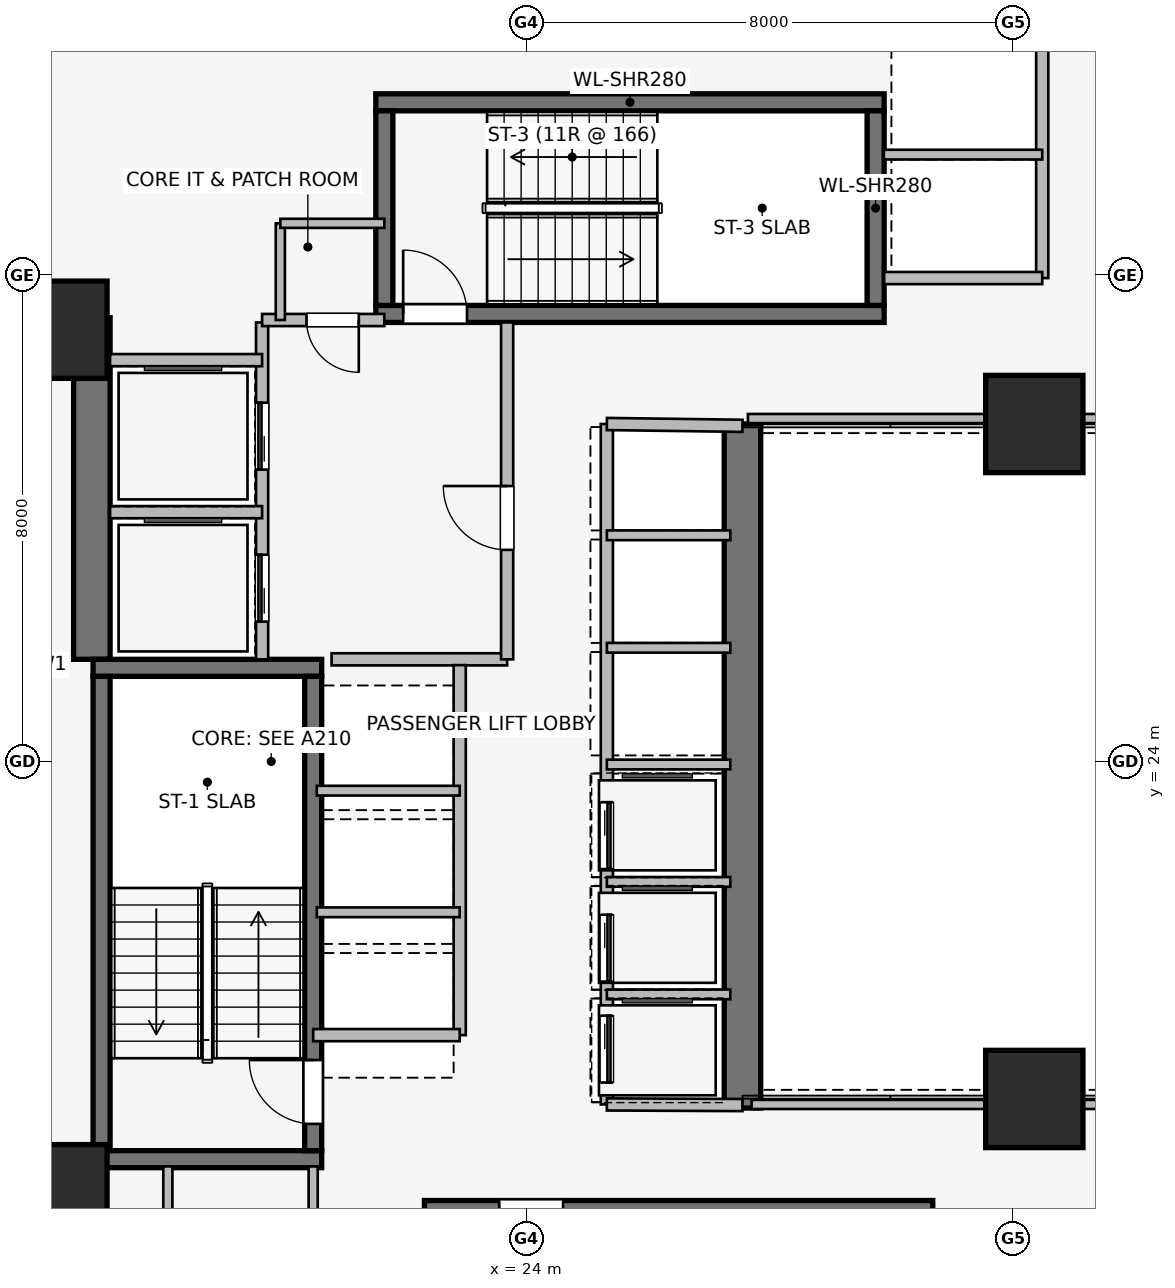
"""IFC4 building model, lengths in metres.
Left out: names, types, materials, properties, quantities, classifications, styles, units other than length and angle.
Written with IfcOpenShell. Run it as: python <this file> out.ifc"""

import sys

from ifc_helpers import new_model, si_unit, direction, frame, frame_2d, origin, origin_2d, place, context, subcontext, project, spatial, rectangle, extrude, element, fill, save


model = new_model("IFC4")
c1 = context("Model", 3, precision=1e-05, world=origin(), true_north=direction((0.0, 1.0)))
c2 = subcontext(c1, "Body", "Model", "MODEL_VIEW")
j1 = project(units=[si_unit("LENGTHUNIT", "METRE"), si_unit("PLANEANGLEUNIT", "RADIAN")], contexts=[c1])
p1 = place(None, origin())
s1 = spatial("IfcSite", under=j1, at=p1, CompositionType="ELEMENT")
p2 = place(p1, origin())
s2 = spatial("IfcBuilding", under=s1, at=p2, CompositionType="ELEMENT")
p3 = place(p2, frame((0.0, 0.0, 34.3)))
s3 = spatial("IfcBuildingStorey", under=s2, at=p3, CompositionType="ELEMENT", Elevation=34.3)
p4 = place(p3, frame((16.85, 25.68, 0.0), z_axis=(0.0, 0.0, 1.0), x_axis=(0.0, 1.0, 0.0)))
e1 = element("IfcWall", 1, at=p4, inside=s3, PredefinedType="SHEAR", context=c2, shape_type="SweptSolid", body=[
    extrude(rectangle(XDim=5.62, YDim=0.6, at=frame_2d((2.81, 0.0))), origin(), (0.0, 0.0, 1.0), 3.65),
])
p5 = place(p3, frame((27.55, 29.55, 0.0), z_axis=(0.0, 0.0, 1.0), x_axis=(0.0, -1.0, 0.0)))
e2 = element("IfcWall", 2, at=p5, inside=s3, PredefinedType="SHEAR", context=c2, shape_type="SweptSolid", body=[
    extrude(rectangle(XDim=11.25, YDim=0.6, at=frame_2d((5.625, 0.0))), origin(), (0.0, 0.0, 1.0), 3.65),
])
for number, where, z_axis, x_axis in (
    (3, (16.87, 17.46, 0.0), (0.0, 0.0, 1.0), (1.0, 0.0, 0.0)),
    (4, (20.63, 25.54, 0.0), (0.0, 0.0, 1.0), (-1.0, 0.0, 0.0)),
):
    element("IfcWall", number, at=place(p3, frame(where, z_axis=z_axis, x_axis=x_axis)), inside=s3, PredefinedType="SHEAR", context=c2, shape_type="SweptSolid", body=[
        extrude(rectangle(XDim=3.76, YDim=0.28, at=frame_2d((1.88, 0.0))), origin(), (0.0, 0.0, 1.0), 3.65),
    ])
p6 = place(p3, frame((17.01, 25.4, 0.0), z_axis=(0.0, 0.0, 1.0), x_axis=(0.0, -1.0, 0.0)))
e5 = element("IfcWall", 5, at=p6, inside=s3, PredefinedType="SHEAR", context=c2, shape_type="SweptSolid", body=[
    extrude(rectangle(XDim=7.8, YDim=0.28, at=frame_2d((3.9, 0.0))), origin(), (0.0, 0.0, 1.0), 3.65),
])
p7 = place(p3, frame((20.49, 17.6, 0.0), z_axis=(0.0, 0.0, 1.0), x_axis=(0.0, 1.0, 0.0)))
e6 = element("IfcWall", 6, at=p7, inside=s3, PredefinedType="SHEAR", context=c2, shape_type="SweptSolid", body=[
    extrude(rectangle(XDim=7.8, YDim=0.28, at=frame_2d((3.9, 0.0))), origin(), (0.0, 0.0, 1.0), 3.65),
])
p8 = place(p7, frame((0.44, 0.0, 0.0)))
e7 = element("IfcOpeningElement", 7, at=p8, cuts=e6, PredefinedType="OPENING", context=c2, shape_type="SweptSolid", body=[
    extrude(rectangle(XDim=1.05, YDim=2.0, at=frame_2d((0.525, 1.0))), frame((0.0, 0.15, 0.0), z_axis=(0.0, -1.0, 0.0), x_axis=(1.0, 0.0, 0.0)), (0.0, 0.0, 1.0), 0.3),
])
p9 = place(p3, frame((30.68, 16.64, 0.0), z_axis=(0.0, 0.0, 1.0), x_axis=(-1.0, 0.0, 0.0)))
e8 = element("IfcWall", 8, at=p9, inside=s3, PredefinedType="SHEAR", context=c2, shape_type="SweptSolid", body=[
    extrude(rectangle(XDim=8.36, YDim=0.28, at=frame_2d((4.18, 0.0))), origin(), (0.0, 0.0, 1.0), 3.65),
])
p10 = place(p9, frame((6.08, 0.0, 0.0)))
e9 = element("IfcOpeningElement", 9, at=p10, cuts=e8, PredefinedType="OPENING", context=c2, shape_type="SweptSolid", body=[
    extrude(rectangle(XDim=1.05, YDim=2.0, at=frame_2d((0.525, 1.0))), frame((0.0, 0.15, 0.0), z_axis=(0.0, -1.0, 0.0), x_axis=(1.0, 0.0, 0.0)), (0.0, 0.0, 1.0), 0.3),
])
p11 = place(p3, frame((21.52, 31.36, 0.0), z_axis=(0.0, 0.0, 1.0), x_axis=(1.0, 0.0, 0.0)))
e10 = element("IfcWall", 10, at=p11, inside=s3, PredefinedType="SHEAR", context=c2, shape_type="SweptSolid", body=[
    extrude(rectangle(XDim=8.36, YDim=0.28, at=frame_2d((4.18, 0.0))), origin(), (0.0, 0.0, 1.0), 3.65),
])
p12 = place(p11, frame((0.45, 0.0, 0.0)))
e11 = element("IfcOpeningElement", 11, at=p12, cuts=e10, PredefinedType="OPENING", context=c2, shape_type="SweptSolid", body=[
    extrude(rectangle(XDim=1.05, YDim=2.0, at=frame_2d((0.525, 1.0))), frame((0.0, 0.15, 0.0), z_axis=(0.0, -1.0, 0.0), x_axis=(1.0, 0.0, 0.0)), (0.0, 0.0, 1.0), 0.3),
])
p13 = place(p3, frame((29.88, 34.84, 0.0), z_axis=(0.0, 0.0, 1.0), x_axis=(-1.0, 0.0, 0.0)))
e12 = element("IfcWall", 12, at=p13, inside=s3, PredefinedType="SHEAR", context=c2, shape_type="SweptSolid", body=[
    extrude(rectangle(XDim=8.36, YDim=0.28, at=frame_2d((4.18, 0.0))), origin(), (0.0, 0.0, 1.0), 3.65),
])
for number, where, z_axis, x_axis in (
    (13, (21.66, 34.7, 0.0), (0.0, 0.0, 1.0), (0.0, -1.0, 0.0)),
    (14, (29.74, 31.5, 0.0), (0.0, 0.0, 1.0), (0.0, 1.0, 0.0)),
):
    element("IfcWall", number, at=place(p3, frame(where, z_axis=z_axis, x_axis=x_axis)), inside=s3, PredefinedType="SHEAR", context=c2, shape_type="SweptSolid", body=[
        extrude(rectangle(XDim=3.2, YDim=0.28, at=frame_2d((1.6, 0.0))), origin(), (0.0, 0.0, 1.0), 3.65),
    ])
for number, where, z_axis, x_axis in (
    (15, (16.3, 16.9, 0.0), (0.0, 0.0, 1.0), (1.0, 0.0, 0.0)),
    (16, (16.3, 31.1, 0.0), (0.0, 0.0, 1.0), (1.0, 0.0, 0.0)),
    (17, (32.35, 18.45, 0.0), (0.0, 0.0, 1.0), (1.0, 0.0, 0.0)),
    (18, (32.35, 29.55, 0.0), (0.0, 0.0, 1.0), (1.0, 0.0, 0.0)),
):
    element("IfcColumn", number, at=place(p3, frame(where, z_axis=z_axis, x_axis=x_axis)), inside=s3, PredefinedType="COLUMN", context=c2, shape_type="SweptSolid", body=[
        extrude(rectangle(XDim=1.6, YDim=1.6, at=origin_2d()), origin(), (0.0, 0.0, 1.0), 3.65),
    ])
p14 = place(p3, frame((19.65, 25.68, 0.0), z_axis=(0.0, 0.0, 1.0), x_axis=(0.0, 1.0, 0.0)))
e19 = element("IfcWall", 19, at=p14, inside=s3, PredefinedType="PARTITIONING", context=c2, shape_type="SweptSolid", body=[
    extrude(rectangle(XDim=5.54, YDim=0.2, at=frame_2d((2.77, 0.0))), origin(), (0.0, 0.0, 1.0), 3.39),
])
p15 = place(p14, frame((0.62, 0.0, 0.0)))
e20 = element("IfcOpeningElement", 20, at=p15, cuts=e19, PredefinedType="OPENING", context=c2, shape_type="SweptSolid", body=[
    extrude(rectangle(XDim=1.1, YDim=2.2, at=frame_2d((0.55, 1.1))), frame((0.0, 0.11, 0.0), z_axis=(0.0, -1.0, 0.0), x_axis=(1.0, 0.0, 0.0)), (0.0, 0.0, 1.0), 0.22),
])
p16 = place(p14, frame((3.12, 0.0, 0.0)))
e21 = element("IfcOpeningElement", 21, at=p16, cuts=e19, PredefinedType="OPENING", context=c2, shape_type="SweptSolid", body=[
    extrude(rectangle(XDim=1.1, YDim=2.2, at=frame_2d((0.55, 1.1))), frame((0.0, 0.11, 0.0), z_axis=(0.0, -1.0, 0.0), x_axis=(1.0, 0.0, 0.0)), (0.0, 0.0, 1.0), 0.22),
])
p17 = place(p3, frame((20.793, 25.68, 0.0), z_axis=(0.0, 0.0, 1.0), x_axis=(1.0, 0.0, 0.0)))
e22 = element("IfcWall", 22, at=p17, inside=s3, PredefinedType="PARTITIONING", context=c2, shape_type="SweptSolid", body=[
    extrude(rectangle(XDim=2.887, YDim=0.2, at=frame_2d((1.443, 0.0))), origin(), (0.0, 0.0, 1.0), 3.39),
])
p18 = place(p3, frame((23.68, 25.68, 0.0), z_axis=(0.0, 0.0, 1.0), x_axis=(0.0, 1.0, 0.0)))
e23 = element("IfcWall", 23, at=p18, inside=s3, PredefinedType="PARTITIONING", context=c2, shape_type="SweptSolid", body=[
    extrude(rectangle(XDim=5.54, YDim=0.2, at=frame_2d((2.77, 0.0))), origin(), (0.0, 0.0, 1.0), 3.39),
])
p19 = place(p18, frame((1.8, 0.0, 0.0)))
e24 = element("IfcOpeningElement", 24, at=p19, cuts=e23, PredefinedType="OPENING", context=c2, shape_type="SweptSolid", body=[
    extrude(rectangle(XDim=1.05, YDim=2.0, at=frame_2d((0.525, 1.0))), frame((0.0, 0.11, 0.0), z_axis=(0.0, -1.0, 0.0), x_axis=(1.0, 0.0, 0.0)), (0.0, 0.0, 1.0), 0.22),
])
p20 = place(p3, frame((21.66, 31.26, 0.0), z_axis=(0.0, 0.0, 1.0), x_axis=(-1.0, 0.0, 0.0)))
e25 = element("IfcWall", 25, at=p20, inside=s3, PredefinedType="PARTITIONING", context=c2, shape_type="SweptSolid", body=[
    extrude(rectangle(XDim=2.01, YDim=0.2, at=frame_2d((1.005, 0.0))), origin(), (0.0, 0.0, 1.0), 3.39),
])
p21 = place(p20, frame((0.42, 0.0, 0.0)))
e26 = element("IfcOpeningElement", 26, at=p21, cuts=e25, PredefinedType="OPENING", context=c2, shape_type="SweptSolid", body=[
    extrude(rectangle(XDim=0.86, YDim=2.0, at=frame_2d((0.43, 1.0))), frame((0.0, 0.11, 0.0), z_axis=(0.0, -1.0, 0.0), x_axis=(1.0, 0.0, 0.0)), (0.0, 0.0, 1.0), 0.22),
])
p22 = place(p3, frame((17.15, 28.1, 0.0), z_axis=(0.0, 0.0, 1.0), x_axis=(1.0, 0.0, 0.0)))
e27 = element("IfcWall", 27, at=p22, inside=s3, PredefinedType="PARTITIONING", context=c2, shape_type="SweptSolid", body=[
    extrude(rectangle(XDim=2.5, YDim=0.2, at=frame_2d((1.25, 0.0))), origin(), (0.0, 0.0, 1.0), 3.39),
])
p23 = place(p3, frame((19.65, 30.6, 0.0), z_axis=(0.0, 0.0, 1.0), x_axis=(-1.0, 0.0, 0.0)))
e28 = element("IfcWall", 28, at=p23, inside=s3, PredefinedType="PARTITIONING", context=c2, shape_type="SweptSolid", body=[
    extrude(rectangle(XDim=2.5, YDim=0.2, at=frame_2d((1.25, 0.0))), origin(), (0.0, 0.0, 1.0), 2.29),
])
p24 = place(p3, frame((32.48, 31.95, 0.0), z_axis=(0.0, 0.0, 1.0), x_axis=(0.0, 1.0, 0.0)))
e29 = element("IfcWall", 29, at=p24, inside=s3, PredefinedType="PARTITIONING", context=c2, shape_type="SweptSolid", body=[
    extrude(rectangle(XDim=4.05, YDim=0.2, at=frame_2d((2.025, 0.0))), origin(), (0.0, 0.0, 1.0), 2.513),
])
p25 = place(p3, frame((32.48, 31.95, 0.0), z_axis=(0.0, 0.0, 1.0), x_axis=(-1.0, 0.0, 0.0)))
e30 = element("IfcWall", 30, at=p25, inside=s3, PredefinedType="PARTITIONING", context=c2, shape_type="SweptSolid", body=[
    extrude(rectangle(XDim=2.6, YDim=0.2, at=frame_2d((1.3, 0.0))), origin(), (0.0, 0.0, 1.0), 3.39),
])
p26 = place(p3, frame((29.875, 33.98, 0.0), z_axis=(0.0, 0.0, 1.0), x_axis=(1.0, 0.0, 0.0)))
e31 = element("IfcWall", 31, at=p26, inside=s3, PredefinedType="PARTITIONING", context=c2, shape_type="SweptSolid", body=[
    extrude(rectangle(XDim=2.605, YDim=0.16, at=frame_2d((1.302, 0.0))), origin(), (0.0, 0.0, 1.0), 3.39),
])
p27 = place(p3, frame((22.9, 19.5, 0.0), z_axis=(0.0, 0.0, 1.0), x_axis=(0.0, 1.0, 0.0)))
e32 = element("IfcWall", 32, at=p27, inside=s3, PredefinedType="PARTITIONING", context=c2, shape_type="SweptSolid", body=[
    extrude(rectangle(XDim=6.085, YDim=0.2, at=frame_2d((3.042, 0.0))), origin(), (0.0, 0.0, 1.0), 3.39),
])
p28 = place(p3, frame((20.49, 19.5, 0.0), z_axis=(0.0, 0.0, 1.0), x_axis=(1.0, 0.0, 0.0)))
e33 = element("IfcWall", 33, at=p28, inside=s3, PredefinedType="PARTITIONING", context=c2, shape_type="SweptSolid", body=[
    extrude(rectangle(XDim=2.41, YDim=0.2, at=frame_2d((1.205, 0.0))), origin(), (0.0, 0.0, 1.0), 2.29),
])
for number, where, z_axis, x_axis in (
    (34, (20.55, 21.52, 0.0), (0.0, 0.0, 1.0), (1.0, 0.0, 0.0)),
    (35, (20.55, 23.52, 0.0), (0.0, 0.0, 1.0), (1.0, 0.0, 0.0)),
):
    element("IfcWall", number, at=place(p3, frame(where, z_axis=z_axis, x_axis=x_axis)), inside=s3, PredefinedType="PARTITIONING", context=c2, shape_type="SweptSolid", body=[
        extrude(rectangle(XDim=2.35, YDim=0.16, at=frame_2d((1.175, 0.0))), origin(), (0.0, 0.0, 1.0), 3.39),
    ])
p29 = place(p3, frame((25.32, 29.55, 0.0), z_axis=(0.0, 0.0, 1.0), x_axis=(0.0, -1.0, 0.0)))
e36 = element("IfcWall", 36, at=p29, inside=s3, PredefinedType="PARTITIONING", context=c2, shape_type="SweptSolid", body=[
    extrude(rectangle(XDim=11.19, YDim=0.2, at=frame_2d((5.595, 0.0))), origin(), (0.0, 0.0, 1.0), 3.39),
])
p30 = place(p29, frame((6.22, 0.0, 0.0)))
e37 = element("IfcOpeningElement", 37, at=p30, cuts=e36, PredefinedType="OPENING", context=c2, shape_type="SweptSolid", body=[
    extrude(rectangle(XDim=1.1, YDim=2.2, at=frame_2d((0.55, 1.1))), frame((0.0, 0.11, 0.0), z_axis=(0.0, -1.0, 0.0), x_axis=(1.0, 0.0, 0.0)), (0.0, 0.0, 1.0), 0.22),
])
p31 = place(p29, frame((8.07, 0.0, 0.0)))
e38 = element("IfcOpeningElement", 38, at=p31, cuts=e36, PredefinedType="OPENING", context=c2, shape_type="SweptSolid", body=[
    extrude(rectangle(XDim=1.1, YDim=2.2, at=frame_2d((0.55, 1.1))), frame((0.0, 0.11, 0.0), z_axis=(0.0, -1.0, 0.0), x_axis=(1.0, 0.0, 0.0)), (0.0, 0.0, 1.0), 0.22),
])
p32 = place(p29, frame((9.73, 0.0, 0.0)))
e39 = element("IfcOpeningElement", 39, at=p32, cuts=e36, PredefinedType="OPENING", context=c2, shape_type="SweptSolid", body=[
    extrude(rectangle(XDim=1.1, YDim=2.2, at=frame_2d((0.55, 1.1))), frame((0.0, 0.11, 0.0), z_axis=(0.0, -1.0, 0.0), x_axis=(1.0, 0.0, 0.0)), (0.0, 0.0, 1.0), 0.22),
])
p33 = place(p3, frame((25.32, 18.36, 0.0), z_axis=(0.0, 0.0, 1.0), x_axis=(0.999989925833, -0.004488678231, 0.0)))
e40 = element("IfcWall", 40, at=p33, inside=s3, PredefinedType="PARTITIONING", context=c2, shape_type="SweptSolid", body=[
    extrude(rectangle(XDim=2.23, YDim=0.2, at=frame_2d((1.115, 0.0))), origin(), (0.0, 0.0, 1.0), 3.39),
])
p34 = place(p3, frame((27.55, 29.52, 0.0), z_axis=(0.0, 0.0, 1.0), x_axis=(-0.999909343457, 0.013464949556, 0.0)))
e41 = element("IfcWall", 41, at=p34, inside=s3, PredefinedType="PARTITIONING", context=c2, shape_type="SweptSolid", body=[
    extrude(rectangle(XDim=2.23, YDim=0.2, at=frame_2d((1.115, 0.0))), origin(), (0.0, 0.0, 1.0), 2.29),
])
for number, where, z_axis, x_axis in (
    (42, (25.32, 20.17, 0.0), (0.0, 0.0, 1.0), (1.0, 0.0, 0.0)),
    (43, (25.32, 22.02, 0.0), (0.0, 0.0, 1.0), (1.0, 0.0, 0.0)),
    (44, (25.32, 23.95, 0.0), (0.0, 0.0, 1.0), (1.0, 0.0, 0.0)),
    (45, (25.32, 25.87, 0.0), (0.0, 0.0, 1.0), (1.0, 0.0, 0.0)),
    (46, (25.32, 27.72, 0.0), (0.0, 0.0, 1.0), (1.0, 0.0, 0.0)),
):
    element("IfcWall", number, at=place(p3, frame(where, z_axis=z_axis, x_axis=x_axis)), inside=s3, PredefinedType="PARTITIONING", context=c2, shape_type="SweptSolid", body=[
        extrude(rectangle(XDim=2.03, YDim=0.16, at=frame_2d((1.015, 0.0))), origin(), (0.0, 0.0, 1.0), 3.39),
    ])
p35 = place(p3, frame((18.1, 17.34, 0.0), z_axis=(0.0, 0.0, 1.0), x_axis=(0.0, -1.0, 0.0)))
e47 = element("IfcWall", 47, at=p35, inside=s3, PredefinedType="PARTITIONING", context=c2, shape_type="SweptSolid", body=[
    extrude(rectangle(XDim=4.14, YDim=0.15, at=frame_2d((2.07, 0.0))), origin(), (0.0, 0.0, 1.0), 3.39),
])
p36 = place(p3, frame((20.49, 13.2, 0.0), z_axis=(0.0, 0.0, 1.0), x_axis=(0.0, 1.0, 0.0)))
e48 = element("IfcWall", 48, at=p36, inside=s3, PredefinedType="PARTITIONING", context=c2, shape_type="SweptSolid", body=[
    extrude(rectangle(XDim=4.14, YDim=0.15, at=frame_2d((2.07, 0.0))), origin(), (0.0, 0.0, 1.0), 3.39),
])
p37 = place(p36, frame((1.25, 0.0, 0.0)))
e49 = element("IfcOpeningElement", 49, at=p37, cuts=e48, PredefinedType="OPENING", context=c2, shape_type="SweptSolid", body=[
    extrude(rectangle(XDim=0.9, YDim=2.0, at=frame_2d((0.45, 1.0))), frame((0.0, 0.085, 0.0), z_axis=(0.0, -1.0, 0.0), x_axis=(1.0, 0.0, 0.0)), (0.0, 0.0, 1.0), 0.17),
])
p38 = place(p3, frame((19.95, 32.85, 0.0), z_axis=(0.0, 0.0, 1.0), x_axis=(0.0, -1.0, 0.0)))
e50 = element("IfcWall", 50, at=p38, inside=s3, PredefinedType="PARTITIONING", context=c2, shape_type="SweptSolid", body=[
    extrude(rectangle(XDim=1.59, YDim=0.15, at=frame_2d((0.795, 0.0))), origin(), (0.0, 0.0, 1.0), 3.39),
])
p39 = place(p3, frame((21.66, 32.85, 0.0), z_axis=(0.0, 0.0, 1.0), x_axis=(-1.0, 0.0, 0.0)))
e51 = element("IfcWall", 51, at=p39, inside=s3, PredefinedType="PARTITIONING", context=c2, shape_type="SweptSolid", body=[
    extrude(rectangle(XDim=1.71, YDim=0.15, at=frame_2d((0.855, 0.0))), origin(), (0.0, 0.0, 1.0), 3.39),
])
p40 = place(p3, frame((27.7, 18.36, 0.0), z_axis=(0.0, 0.0, 1.0), x_axis=(1.0, 0.0, 0.0)))
e52 = element("IfcWall", 52, at=p40, inside=s3, PredefinedType="PARTITIONING", context=c2, shape_type="SweptSolid", body=[
    extrude(rectangle(XDim=12.14, YDim=0.15, at=frame_2d((6.07, 0.0))), origin(), (0.0, 0.0, 1.0), 2.03),
])
p41 = place(p3, frame((39.84, 29.64, 0.0), z_axis=(0.0, 0.0, 1.0), x_axis=(-1.0, 0.0, 0.0)))
e53 = element("IfcWall", 53, at=p41, inside=s3, PredefinedType="PARTITIONING", context=c2, shape_type="SweptSolid", body=[
    extrude(rectangle(XDim=12.2, YDim=0.15, at=frame_2d((6.1, 0.0))), origin(), (0.0, 0.0, 1.0), 2.03),
])
p42 = place(p8, origin())
e54 = element("IfcDoor", 54, at=p42, inside=s3, OperationType="SINGLE_SWING_RIGHT", PredefinedType="DOOR", context=c2, shape_type="SweptSolid", body=[
    extrude(rectangle(XDim=1.05, YDim=2.0, at=frame_2d((0.525, 1.0))), frame((0.0, 0.025, 0.0), z_axis=(0.0, -1.0, 0.0), x_axis=(1.0, 0.0, 0.0)), (0.0, 0.0, 1.0), 0.05),
])
fill(e7, e54)
p43 = place(p10, origin())
e55 = element("IfcDoor", 55, at=p43, inside=s3, OperationType="SINGLE_SWING_RIGHT", PredefinedType="DOOR", context=c2, shape_type="SweptSolid", body=[
    extrude(rectangle(XDim=1.05, YDim=2.0, at=frame_2d((0.525, 1.0))), frame((0.0, 0.025, 0.0), z_axis=(0.0, -1.0, 0.0), x_axis=(1.0, 0.0, 0.0)), (0.0, 0.0, 1.0), 0.05),
])
fill(e9, e55)
p44 = place(p12, origin())
e56 = element("IfcDoor", 56, at=p44, inside=s3, OperationType="SINGLE_SWING_LEFT", PredefinedType="DOOR", context=c2, shape_type="SweptSolid", body=[
    extrude(rectangle(XDim=1.05, YDim=2.0, at=frame_2d((0.525, 1.0))), frame((0.0, 0.025, 0.0), z_axis=(0.0, -1.0, 0.0), x_axis=(1.0, 0.0, 0.0)), (0.0, 0.0, 1.0), 0.05),
])
fill(e11, e56)
p45 = place(p15, origin())
e57 = element("IfcDoor", 57, at=p45, inside=s3, OperationType="SLIDING_TO_LEFT", PredefinedType="DOOR", context=c2, shape_type="SweptSolid", body=[
    extrude(rectangle(XDim=1.1, YDim=2.2, at=frame_2d((0.55, 1.1))), frame((0.0, 0.025, 0.0), z_axis=(0.0, -1.0, 0.0), x_axis=(1.0, 0.0, 0.0)), (0.0, 0.0, 1.0), 0.05),
])
fill(e20, e57)
p46 = place(p16, origin())
e58 = element("IfcDoor", 58, at=p46, inside=s3, OperationType="SLIDING_TO_LEFT", PredefinedType="DOOR", context=c2, shape_type="SweptSolid", body=[
    extrude(rectangle(XDim=1.1, YDim=2.2, at=frame_2d((0.55, 1.1))), frame((0.0, 0.025, 0.0), z_axis=(0.0, -1.0, 0.0), x_axis=(1.0, 0.0, 0.0)), (0.0, 0.0, 1.0), 0.05),
])
fill(e21, e58)
p47 = place(p19, origin())
e59 = element("IfcDoor", 59, at=p47, inside=s3, OperationType="SINGLE_SWING_RIGHT", PredefinedType="DOOR", context=c2, shape_type="SweptSolid", body=[
    extrude(rectangle(XDim=1.05, YDim=2.0, at=frame_2d((0.525, 1.0))), frame((0.0, 0.025, 0.0), z_axis=(0.0, -1.0, 0.0), x_axis=(1.0, 0.0, 0.0)), (0.0, 0.0, 1.0), 0.05),
])
fill(e24, e59)
p48 = place(p21, origin())
e60 = element("IfcDoor", 60, at=p48, inside=s3, OperationType="SINGLE_SWING_LEFT", PredefinedType="DOOR", context=c2, shape_type="SweptSolid", body=[
    extrude(rectangle(XDim=0.86, YDim=2.0, at=frame_2d((0.43, 1.0))), frame((0.0, 0.025, 0.0), z_axis=(0.0, -1.0, 0.0), x_axis=(1.0, 0.0, 0.0)), (0.0, 0.0, 1.0), 0.05),
])
fill(e26, e60)
p49 = place(p30, origin())
e61 = element("IfcDoor", 61, at=p49, inside=s3, OperationType="SLIDING_TO_LEFT", PredefinedType="DOOR", context=c2, shape_type="SweptSolid", body=[
    extrude(rectangle(XDim=1.1, YDim=2.2, at=frame_2d((0.55, 1.1))), frame((0.0, 0.025, 0.0), z_axis=(0.0, -1.0, 0.0), x_axis=(1.0, 0.0, 0.0)), (0.0, 0.0, 1.0), 0.05),
])
fill(e37, e61)
p50 = place(p31, origin())
e62 = element("IfcDoor", 62, at=p50, inside=s3, OperationType="SLIDING_TO_LEFT", PredefinedType="DOOR", context=c2, shape_type="SweptSolid", body=[
    extrude(rectangle(XDim=1.1, YDim=2.2, at=frame_2d((0.55, 1.1))), frame((0.0, 0.025, 0.0), z_axis=(0.0, -1.0, 0.0), x_axis=(1.0, 0.0, 0.0)), (0.0, 0.0, 1.0), 0.05),
])
fill(e38, e62)
p51 = place(p32, origin())
e63 = element("IfcDoor", 63, at=p51, inside=s3, OperationType="SLIDING_TO_LEFT", PredefinedType="DOOR", context=c2, shape_type="SweptSolid", body=[
    extrude(rectangle(XDim=1.1, YDim=2.2, at=frame_2d((0.55, 1.1))), frame((0.0, 0.025, 0.0), z_axis=(0.0, -1.0, 0.0), x_axis=(1.0, 0.0, 0.0)), (0.0, 0.0, 1.0), 0.05),
])
fill(e39, e63)
save(model, sys.argv[1])
